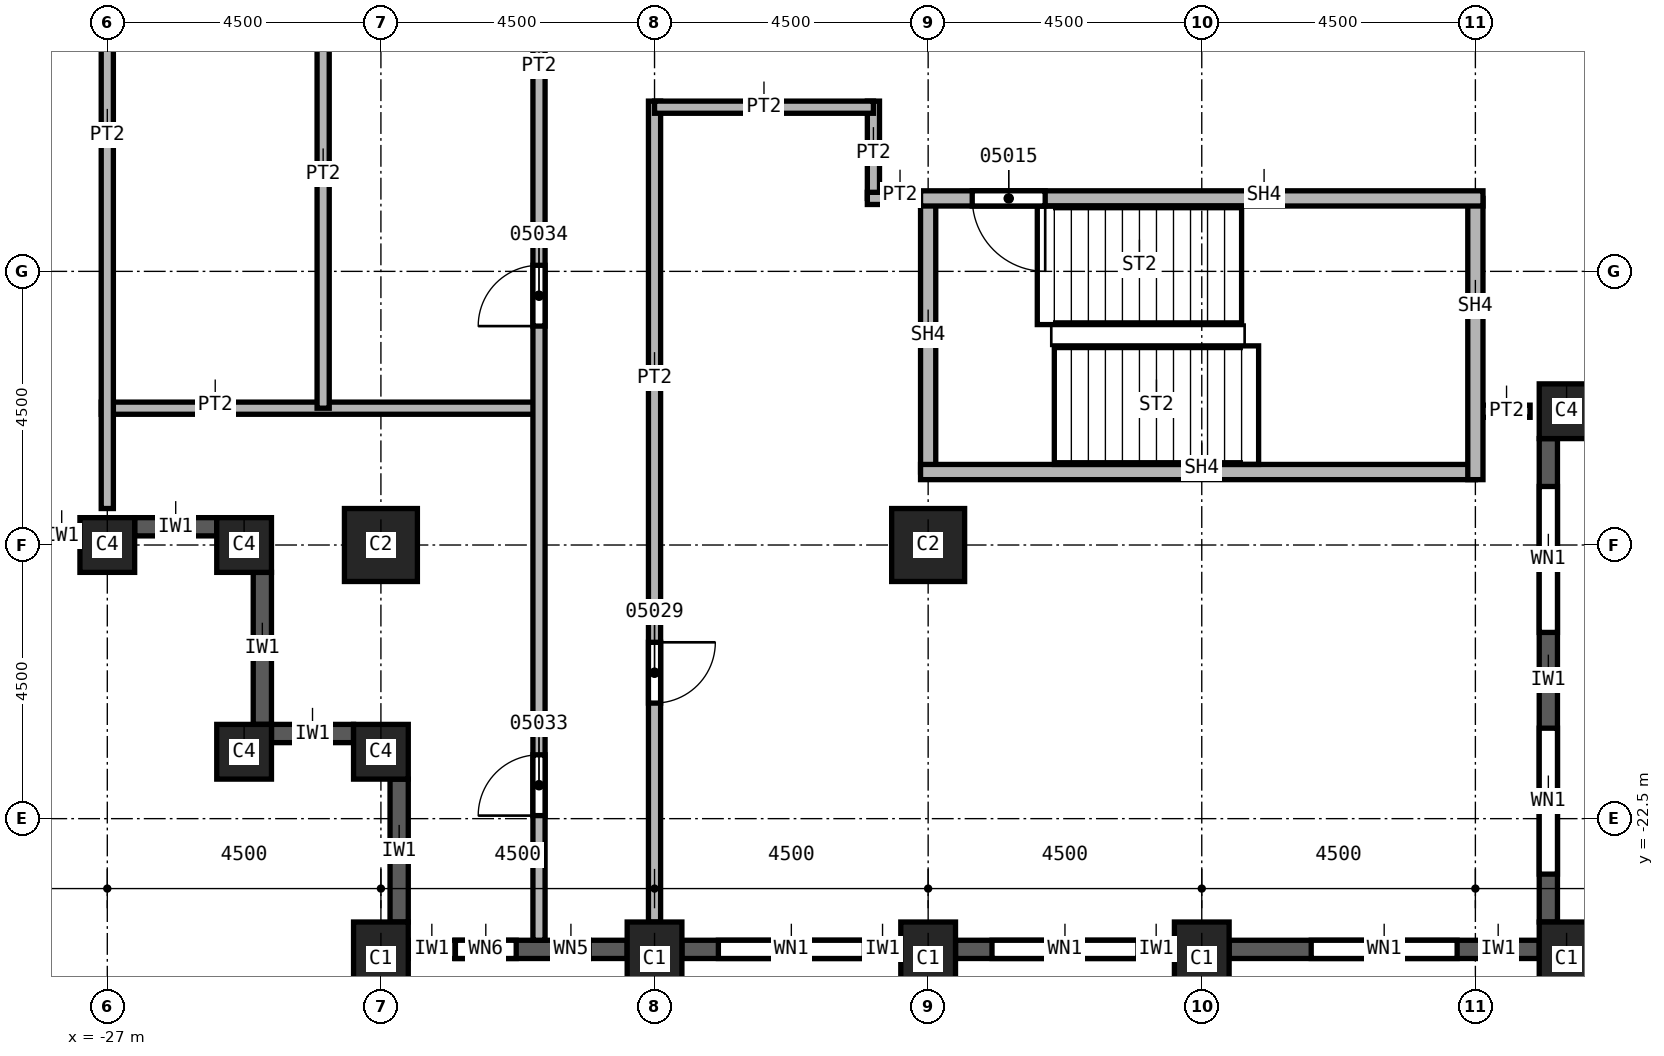
"""IFC4 building model, lengths in metres.
Left out: names, types, materials, properties, quantities, classifications, styles, units other than length and angle.
Written with IfcOpenShell. Run it as: python <this file> out.ifc"""

import sys

from ifc_helpers import new_model, si_unit, direction, frame, frame_2d, origin, origin_2d, place, context, subcontext, project, spatial, rectangle, extrude, element, fill, save


model = new_model("IFC4")
c1 = context("Model", 3, precision=1e-05, world=origin(), true_north=direction((0.0, 1.0)))
c2 = subcontext(c1, "Body", "Model", "MODEL_VIEW")
j1 = project(units=[si_unit("LENGTHUNIT", "METRE"), si_unit("PLANEANGLEUNIT", "RADIAN")], contexts=[c1])
p1 = place(None, origin())
s1 = spatial("IfcSite", under=j1, at=p1, CompositionType="ELEMENT")
p2 = place(p1, origin())
s2 = spatial("IfcBuilding", under=s1, at=p2, CompositionType="ELEMENT")
p3 = place(p2, frame((0.0, 0.0, 116.0)))
s3 = spatial("IfcBuildingStorey", under=s2, at=p3, CompositionType="ELEMENT", Elevation=116.0)
for number, where, z_axis, x_axis in (
    (1, (-13.5, -18.0, 0.0), (0.0, 0.0, 1.0), (1.0, 0.0, 0.0)),
    (2, (-22.5, -18.0, 0.0), (0.0, 0.0, 1.0), (1.0, 0.0, 0.0)),
):
    element("IfcColumn", number, at=place(p3, frame(where, z_axis=z_axis, x_axis=x_axis)), inside=s3, PredefinedType="COLUMN", context=c2, shape_type="SweptSolid", body=[
        extrude(rectangle(XDim=1.2, YDim=1.2, at=origin_2d()), origin(), (0.0, 0.0, 1.0), 3.6),
    ])
for number, where, z_axis, x_axis in (
    (3, (-3.0, -24.8, 0.0), (0.0, 0.0, 1.0), (1.0, 0.0, 0.0)),
    (4, (-9.0, -24.8, 0.0), (0.0, 0.0, 1.0), (1.0, 0.0, 0.0)),
    (5, (-13.5, -24.8, 0.0), (0.0, 0.0, 1.0), (1.0, 0.0, 0.0)),
    (6, (-18.0, -24.8, 0.0), (0.0, 0.0, 1.0), (1.0, 0.0, 0.0)),
    (7, (-22.5, -24.8, 0.0), (0.0, 0.0, 1.0), (1.0, 0.0, 0.0)),
):
    element("IfcColumn", number, at=place(p3, frame(where, z_axis=z_axis, x_axis=x_axis)), inside=s3, PredefinedType="COLUMN", context=c2, shape_type="SweptSolid", body=[
        extrude(rectangle(XDim=0.9, YDim=1.2, at=origin_2d()), origin(), (0.0, 0.0, 1.0), 3.6),
    ])
for number, where, z_axis, x_axis in (
    (8, (-27.0, -18.0, 0.0), (0.0, 0.0, 1.0), (1.0, 0.0, 0.0)),
    (9, (-3.0, -15.8, 0.0), (0.0, 0.0, 1.0), (1.0, 0.0, 0.0)),
    (10, (-22.5, -21.4, 0.0), (0.0, 0.0, 1.0), (1.0, 0.0, 0.0)),
    (11, (-24.75, -21.4, 0.0), (0.0, 0.0, 1.0), (1.0, 0.0, 0.0)),
    (12, (-24.75, -18.0, 0.0), (0.0, 0.0, 1.0), (1.0, 0.0, 0.0)),
):
    element("IfcColumn", number, at=place(p3, frame(where, z_axis=z_axis, x_axis=x_axis)), inside=s3, PredefinedType="COLUMN", context=c2, shape_type="SweptSolid", body=[
        extrude(rectangle(XDim=0.9, YDim=0.9, at=origin_2d()), origin(), (0.0, 0.0, 1.0), 3.6),
    ])
p4 = place(p3, frame((-31.05, -17.85, 0.0), z_axis=(0.0, 0.0, 1.0), x_axis=(1.0, 0.0, 0.0)))
e13 = element("IfcWall", 13, at=p4, inside=s3, PredefinedType="SOLIDWALL", context=c2, shape_type="SweptSolid", body=[
    extrude(rectangle(XDim=3.6, YDim=0.3, at=frame_2d((1.8, 0.0))), origin(), (0.0, 0.0, 1.0), 3.0),
])
p5 = place(p4, frame((0.6, 0.0, 0.8)))
e14 = element("IfcOpeningElement", 14, at=p5, cuts=e13, PredefinedType="OPENING", context=c2, shape_type="SweptSolid", body=[
    extrude(rectangle(XDim=2.4, YDim=1.95, at=frame_2d((1.2, 0.975))), frame((0.0, 0.15, 0.0), z_axis=(0.0, -1.0, 0.0), x_axis=(1.0, 0.0, 0.0)), (0.0, 0.0, 1.0), 0.3),
])
p6 = place(p3, frame((-26.55, -17.7, 0.0), z_axis=(0.0, 0.0, 1.0), x_axis=(1.0, 0.0, 0.0)))
e15 = element("IfcWall", 15, at=p6, inside=s3, PredefinedType="SOLIDWALL", context=c2, shape_type="SweptSolid", body=[
    extrude(rectangle(XDim=1.35, YDim=0.3, at=frame_2d((0.675, 0.0))), origin(), (0.0, 0.0, 1.0), 3.0),
])
p7 = place(p3, frame((-24.45, -18.45, 0.0), z_axis=(0.0, 0.0, 1.0), x_axis=(0.0, -1.0, 0.0)))
e16 = element("IfcWall", 16, at=p7, inside=s3, PredefinedType="SOLIDWALL", context=c2, shape_type="SweptSolid", body=[
    extrude(rectangle(XDim=2.5, YDim=0.3, at=frame_2d((1.25, 0.0))), origin(), (0.0, 0.0, 1.0), 3.0),
])
p8 = place(p3, frame((-24.3, -21.1, 0.0), z_axis=(0.0, 0.0, 1.0), x_axis=(1.0, 0.0, 0.0)))
e17 = element("IfcWall", 17, at=p8, inside=s3, PredefinedType="SOLIDWALL", context=c2, shape_type="SweptSolid", body=[
    extrude(rectangle(XDim=1.35, YDim=0.3, at=frame_2d((0.675, 0.0))), origin(), (0.0, 0.0, 1.0), 3.0),
])
p9 = place(p3, frame((-22.2, -21.85, 0.0), z_axis=(0.0, 0.0, 1.0), x_axis=(0.0, -1.0, 0.0)))
e18 = element("IfcWall", 18, at=p9, inside=s3, PredefinedType="SOLIDWALL", context=c2, shape_type="SweptSolid", body=[
    extrude(rectangle(XDim=2.35, YDim=0.3, at=frame_2d((1.175, 0.0))), origin(), (0.0, 0.0, 1.0), 3.0),
])
p10 = place(p3, frame((-22.05, -24.65, 0.0), z_axis=(0.0, 0.0, 1.0), x_axis=(1.0, 0.0, 0.0)))
e19 = element("IfcWall", 19, at=p10, inside=s3, PredefinedType="SOLIDWALL", context=c2, shape_type="SweptSolid", body=[
    extrude(rectangle(XDim=3.6, YDim=0.3, at=frame_2d((1.8, 0.0))), origin(), (0.0, 0.0, 1.0), 3.0),
])
p11 = place(p10, frame((0.775, 0.0, 0.8)))
e20 = element("IfcOpeningElement", 20, at=p11, cuts=e19, PredefinedType="OPENING", context=c2, shape_type="SweptSolid", body=[
    extrude(rectangle(XDim=1.0, YDim=1.95, at=frame_2d((0.5, 0.975))), frame((0.0, 0.15, 0.0), z_axis=(0.0, -1.0, 0.0), x_axis=(1.0, 0.0, 0.0)), (0.0, 0.0, 1.0), 0.3),
])
p12 = place(p10, frame((2.375, 0.0, 0.8)))
e21 = element("IfcOpeningElement", 21, at=p12, cuts=e19, PredefinedType="OPENING", context=c2, shape_type="SweptSolid", body=[
    extrude(rectangle(XDim=0.6, YDim=1.95, at=frame_2d((0.3, 0.975))), frame((0.0, 0.15, 0.0), z_axis=(0.0, -1.0, 0.0), x_axis=(1.0, 0.0, 0.0)), (0.0, 0.0, 1.0), 0.3),
])
p13 = place(p3, frame((-17.55, -24.65, 0.0), z_axis=(0.0, 0.0, 1.0), x_axis=(1.0, 0.0, 0.0)))
e22 = element("IfcWall", 22, at=p13, inside=s3, PredefinedType="SOLIDWALL", context=c2, shape_type="SweptSolid", body=[
    extrude(rectangle(XDim=3.6, YDim=0.3, at=frame_2d((1.8, 0.0))), origin(), (0.0, 0.0, 1.0), 3.0),
])
p14 = place(p13, frame((0.6, 0.0, 0.8)))
e23 = element("IfcOpeningElement", 23, at=p14, cuts=e22, PredefinedType="OPENING", context=c2, shape_type="SweptSolid", body=[
    extrude(rectangle(XDim=2.4, YDim=1.95, at=frame_2d((1.2, 0.975))), frame((0.0, 0.15, 0.0), z_axis=(0.0, -1.0, 0.0), x_axis=(1.0, 0.0, 0.0)), (0.0, 0.0, 1.0), 0.3),
])
p15 = place(p3, frame((-13.05, -24.65, 0.0), z_axis=(0.0, 0.0, 1.0), x_axis=(1.0, 0.0, 0.0)))
e24 = element("IfcWall", 24, at=p15, inside=s3, PredefinedType="SOLIDWALL", context=c2, shape_type="SweptSolid", body=[
    extrude(rectangle(XDim=3.6, YDim=0.3, at=frame_2d((1.8, 0.0))), origin(), (0.0, 0.0, 1.0), 3.0),
])
p16 = place(p15, frame((0.6, 0.0, 0.8)))
e25 = element("IfcOpeningElement", 25, at=p16, cuts=e24, PredefinedType="OPENING", context=c2, shape_type="SweptSolid", body=[
    extrude(rectangle(XDim=2.4, YDim=1.95, at=frame_2d((1.2, 0.975))), frame((0.0, 0.15, 0.0), z_axis=(0.0, -1.0, 0.0), x_axis=(1.0, 0.0, 0.0)), (0.0, 0.0, 1.0), 0.3),
])
p17 = place(p3, frame((-8.55, -24.65, 0.0), z_axis=(0.0, 0.0, 1.0), x_axis=(1.0, 0.0, 0.0)))
e26 = element("IfcWall", 26, at=p17, inside=s3, PredefinedType="SOLIDWALL", context=c2, shape_type="SweptSolid", body=[
    extrude(rectangle(XDim=5.1, YDim=0.3, at=frame_2d((2.55, 0.0))), origin(), (0.0, 0.0, 1.0), 3.0),
])
p18 = place(p17, frame((1.35, 0.0, 0.8)))
e27 = element("IfcOpeningElement", 27, at=p18, cuts=e26, PredefinedType="OPENING", context=c2, shape_type="SweptSolid", body=[
    extrude(rectangle(XDim=2.4, YDim=1.95, at=frame_2d((1.2, 0.975))), frame((0.0, 0.15, 0.0), z_axis=(0.0, -1.0, 0.0), x_axis=(1.0, 0.0, 0.0)), (0.0, 0.0, 1.0), 0.3),
])
p19 = place(p3, frame((-3.3, -24.2, 0.0), z_axis=(0.0, 0.0, 1.0), x_axis=(0.0, 1.0, 0.0)))
e28 = element("IfcWall", 28, at=p19, inside=s3, PredefinedType="SOLIDWALL", context=c2, shape_type="SweptSolid", body=[
    extrude(rectangle(XDim=7.95, YDim=0.3, at=frame_2d((3.975, 0.0))), origin(), (0.0, 0.0, 1.0), 3.0),
])
p20 = place(p19, frame((0.788, 0.0, 0.8)))
e29 = element("IfcOpeningElement", 29, at=p20, cuts=e28, PredefinedType="OPENING", context=c2, shape_type="SweptSolid", body=[
    extrude(rectangle(XDim=2.4, YDim=1.95, at=frame_2d((1.2, 0.975))), frame((0.0, 0.15, 0.0), z_axis=(0.0, -1.0, 0.0), x_axis=(1.0, 0.0, 0.0)), (0.0, 0.0, 1.0), 0.3),
])
p21 = place(p19, frame((4.762, 0.0, 0.8)))
e30 = element("IfcOpeningElement", 30, at=p21, cuts=e28, PredefinedType="OPENING", context=c2, shape_type="SweptSolid", body=[
    extrude(rectangle(XDim=2.4, YDim=1.95, at=frame_2d((1.2, 0.975))), frame((0.0, 0.15, 0.0), z_axis=(0.0, -1.0, 0.0), x_axis=(1.0, 0.0, 0.0)), (0.0, 0.0, 1.0), 0.3),
])
p22 = place(p3, frame((-27.1, -15.75, 0.0), z_axis=(0.0, 0.0, 1.0), x_axis=(1.0, 0.0, 0.0)))
e31 = element("IfcWall", 31, at=p22, inside=s3, PredefinedType="PARTITIONING", context=c2, shape_type="SweptSolid", body=[
    extrude(rectangle(XDim=7.2, YDim=0.2, at=frame_2d((3.6, 0.0))), origin(), (0.0, 0.0, 1.0), 3.6),
])
p23 = place(p3, frame((-27.0, -17.4, 0.0), z_axis=(0.0, 0.0, 1.0), x_axis=(0.0, 1.0, 0.0)))
e32 = element("IfcWall", 32, at=p23, inside=s3, PredefinedType="PARTITIONING", context=c2, shape_type="SweptSolid", body=[
    extrude(rectangle(XDim=18.15, YDim=0.2, at=frame_2d((9.075, 0.0))), origin(), (0.0, 0.0, 1.0), 3.6),
])
p24 = place(p3, frame((-23.45, -15.75, 0.0), z_axis=(0.0, 0.0, 1.0), x_axis=(0.0, 1.0, 0.0)))
e33 = element("IfcWall", 33, at=p24, inside=s3, PredefinedType="PARTITIONING", context=c2, shape_type="SweptSolid", body=[
    extrude(rectangle(XDim=16.5, YDim=0.2, at=frame_2d((8.25, 0.0))), origin(), (0.0, 0.0, 1.0), 3.6),
])
p25 = place(p24, frame((7.6, 0.0, 0.0)))
e34 = element("IfcOpeningElement", 34, at=p25, cuts=e33, PredefinedType="OPENING", context=c2, shape_type="SweptSolid", body=[
    extrude(rectangle(XDim=1.0, YDim=2.1, at=frame_2d((0.5, 1.05))), frame((0.0, 0.1, 0.0), z_axis=(0.0, -1.0, 0.0), x_axis=(1.0, 0.0, 0.0)), (0.0, 0.0, 1.0), 0.2),
])
p26 = place(p24, frame((13.15, 0.0, 0.0)))
e35 = element("IfcOpeningElement", 35, at=p26, cuts=e33, PredefinedType="OPENING", context=c2, shape_type="SweptSolid", body=[
    extrude(rectangle(XDim=1.0, YDim=2.1, at=frame_2d((0.5, 1.05))), frame((0.0, 0.1, 0.0), z_axis=(0.0, -1.0, 0.0), x_axis=(1.0, 0.0, 0.0)), (0.0, 0.0, 1.0), 0.2),
])
p27 = place(p3, frame((-19.9, -24.5, 0.0), z_axis=(0.0, 0.0, 1.0), x_axis=(0.0, 1.0, 0.0)))
e36 = element("IfcWall", 36, at=p27, inside=s3, PredefinedType="PARTITIONING", context=c2, shape_type="SweptSolid", body=[
    extrude(rectangle(XDim=25.35, YDim=0.2, at=frame_2d((12.675, 0.0))), origin(), (0.0, 0.0, 1.0), 3.6),
])
p28 = place(p27, frame((2.05, 0.0, 0.0)))
e37 = element("IfcOpeningElement", 37, at=p28, cuts=e36, PredefinedType="OPENING", context=c2, shape_type="SweptSolid", body=[
    extrude(rectangle(XDim=1.0, YDim=2.1, at=frame_2d((0.5, 1.05))), frame((0.0, 0.1, 0.0), z_axis=(0.0, -1.0, 0.0), x_axis=(1.0, 0.0, 0.0)), (0.0, 0.0, 1.0), 0.2),
])
p29 = place(p27, frame((10.1, 0.0, 0.0)))
e38 = element("IfcOpeningElement", 38, at=p29, cuts=e36, PredefinedType="OPENING", context=c2, shape_type="SweptSolid", body=[
    extrude(rectangle(XDim=1.0, YDim=2.1, at=frame_2d((0.5, 1.05))), frame((0.0, 0.1, 0.0), z_axis=(0.0, -1.0, 0.0), x_axis=(1.0, 0.0, 0.0)), (0.0, 0.0, 1.0), 0.2),
])
p30 = place(p27, frame((22.85, 0.0, 0.0)))
e39 = element("IfcOpeningElement", 39, at=p30, cuts=e36, PredefinedType="OPENING", context=c2, shape_type="SweptSolid", body=[
    extrude(rectangle(XDim=1.0, YDim=2.1, at=frame_2d((0.5, 1.05))), frame((0.0, 0.1, 0.0), z_axis=(0.0, -1.0, 0.0), x_axis=(1.0, 0.0, 0.0)), (0.0, 0.0, 1.0), 0.2),
])
p31 = place(p3, frame((-18.0, -10.7, 0.0), z_axis=(0.0, 0.0, 1.0), x_axis=(0.0, -1.0, 0.0)))
e40 = element("IfcWall", 40, at=p31, inside=s3, PredefinedType="PARTITIONING", context=c2, shape_type="SweptSolid", body=[
    extrude(rectangle(XDim=13.5, YDim=0.2, at=frame_2d((6.75, 0.0))), origin(), (0.0, 0.0, 1.0), 3.6),
])
p32 = place(p31, frame((8.9, 0.0, 0.0)))
e41 = element("IfcOpeningElement", 41, at=p32, cuts=e40, PredefinedType="OPENING", context=c2, shape_type="SweptSolid", body=[
    extrude(rectangle(XDim=1.0, YDim=2.1, at=frame_2d((0.5, 1.05))), frame((0.0, 0.1, 0.0), z_axis=(0.0, -1.0, 0.0), x_axis=(1.0, 0.0, 0.0)), (0.0, 0.0, 1.0), 0.2),
])
p33 = place(p3, frame((-14.4, -12.3, 0.0), z_axis=(0.0, 0.0, 1.0), x_axis=(0.0, 1.0, 0.0)))
e42 = element("IfcWall", 42, at=p33, inside=s3, PredefinedType="PARTITIONING", context=c2, shape_type="SweptSolid", body=[
    extrude(rectangle(XDim=1.6, YDim=0.2, at=frame_2d((0.8, 0.0))), origin(), (0.0, 0.0, 1.0), 3.6),
])
p34 = place(p3, frame((-14.4, -10.8, 0.0), z_axis=(0.0, 0.0, 1.0), x_axis=(-1.0, 0.0, 0.0)))
e43 = element("IfcWall", 43, at=p34, inside=s3, PredefinedType="PARTITIONING", context=c2, shape_type="SweptSolid", body=[
    extrude(rectangle(XDim=3.6, YDim=0.2, at=frame_2d((1.8, 0.0))), origin(), (0.0, 0.0, 1.0), 3.6),
])
p35 = place(p3, frame((-13.375, -12.3, 0.0), z_axis=(0.0, 0.0, 1.0), x_axis=(-1.0, 0.0, 0.0)))
e44 = element("IfcWall", 44, at=p35, inside=s3, PredefinedType="PARTITIONING", context=c2, shape_type="SweptSolid", body=[
    extrude(rectangle(XDim=1.125, YDim=0.2, at=frame_2d((0.562, 0.0))), origin(), (0.0, 0.0, 1.0), 3.6),
])
p36 = place(p3, frame((-3.6, -15.8, 0.0), z_axis=(0.0, 0.0, 1.0), x_axis=(-1.0, 0.0, 0.0)))
e45 = element("IfcWall", 45, at=p36, inside=s3, PredefinedType="PARTITIONING", context=c2, shape_type="SweptSolid", body=[
    extrude(rectangle(XDim=0.9, YDim=0.2, at=frame_2d((0.45, 0.0))), origin(), (0.0, 0.0, 1.0), 3.6),
])
p37 = place(p3, frame((-13.5, -16.8, 0.0), z_axis=(0.0, 0.0, 1.0), x_axis=(0.0, 1.0, 0.0)))
e46 = element("IfcWall", 46, at=p37, inside=s3, PredefinedType="SOLIDWALL", context=c2, shape_type="SweptSolid", body=[
    extrude(rectangle(XDim=4.5, YDim=0.25, at=frame_2d((2.25, 0.0))), origin(), (0.0, 0.0, 1.0), 3.6),
])
p38 = place(p3, frame((-4.5, -16.8, 0.0), z_axis=(0.0, 0.0, 1.0), x_axis=(-1.0, 0.0, 0.0)))
e47 = element("IfcWall", 47, at=p38, inside=s3, PredefinedType="SOLIDWALL", context=c2, shape_type="SweptSolid", body=[
    extrude(rectangle(XDim=9.125, YDim=0.25, at=frame_2d((4.562, 0.0))), origin(), (0.0, 0.0, 1.0), 3.6),
])
p39 = place(p3, frame((-4.5, -12.3, 0.0), z_axis=(0.0, 0.0, 1.0), x_axis=(0.0, -1.0, 0.0)))
e48 = element("IfcWall", 48, at=p39, inside=s3, PredefinedType="SOLIDWALL", context=c2, shape_type="SweptSolid", body=[
    extrude(rectangle(XDim=4.625, YDim=0.25, at=frame_2d((2.312, 0.0))), origin(), (0.0, 0.0, 1.0), 3.6),
])
p40 = place(p3, frame((-4.375, -12.3, 0.0), z_axis=(0.0, 0.0, 1.0), x_axis=(-1.0, 0.0, 0.0)))
e49 = element("IfcWall", 49, at=p40, inside=s3, PredefinedType="SOLIDWALL", context=c2, shape_type="SweptSolid", body=[
    extrude(rectangle(XDim=9.25, YDim=0.25, at=frame_2d((4.625, 0.0))), origin(), (0.0, 0.0, 1.0), 3.6),
])
p41 = place(p40, frame((7.2, 0.0, 0.0)))
e50 = element("IfcOpeningElement", 50, at=p41, cuts=e49, PredefinedType="OPENING", context=c2, shape_type="SweptSolid", body=[
    extrude(rectangle(XDim=1.2, YDim=2.1, at=frame_2d((0.6, 1.05))), frame((0.0, 0.125, 0.0), z_axis=(0.0, -1.0, 0.0), x_axis=(1.0, 0.0, 0.0)), (0.0, 0.0, 1.0), 0.25),
])
p42 = place(p14, origin())
e51 = element("IfcWindow", 51, at=p42, inside=s3, PartitioningType="SINGLE_PANEL", PredefinedType="WINDOW", context=c2, shape_type="SweptSolid", body=[
    extrude(rectangle(XDim=2.4, YDim=1.95, at=frame_2d((1.2, 0.975))), frame((0.0, 0.03, 0.0), z_axis=(0.0, -1.0, 0.0), x_axis=(1.0, 0.0, 0.0)), (0.0, 0.0, 1.0), 0.06),
])
fill(e23, e51)
p43 = place(p16, origin())
e52 = element("IfcWindow", 52, at=p43, inside=s3, PartitioningType="SINGLE_PANEL", PredefinedType="WINDOW", context=c2, shape_type="SweptSolid", body=[
    extrude(rectangle(XDim=2.4, YDim=1.95, at=frame_2d((1.2, 0.975))), frame((0.0, 0.03, 0.0), z_axis=(0.0, -1.0, 0.0), x_axis=(1.0, 0.0, 0.0)), (0.0, 0.0, 1.0), 0.06),
])
fill(e25, e52)
p44 = place(p18, origin())
e53 = element("IfcWindow", 53, at=p44, inside=s3, PartitioningType="SINGLE_PANEL", PredefinedType="WINDOW", context=c2, shape_type="SweptSolid", body=[
    extrude(rectangle(XDim=2.4, YDim=1.95, at=frame_2d((1.2, 0.975))), frame((0.0, 0.03, 0.0), z_axis=(0.0, -1.0, 0.0), x_axis=(1.0, 0.0, 0.0)), (0.0, 0.0, 1.0), 0.06),
])
fill(e27, e53)
p45 = place(p20, origin())
e54 = element("IfcWindow", 54, at=p45, inside=s3, PartitioningType="SINGLE_PANEL", PredefinedType="WINDOW", context=c2, shape_type="SweptSolid", body=[
    extrude(rectangle(XDim=2.4, YDim=1.95, at=frame_2d((1.2, 0.975))), frame((0.0, 0.03, 0.0), z_axis=(0.0, -1.0, 0.0), x_axis=(1.0, 0.0, 0.0)), (0.0, 0.0, 1.0), 0.06),
])
fill(e29, e54)
p46 = place(p21, origin())
e55 = element("IfcWindow", 55, at=p46, inside=s3, PartitioningType="SINGLE_PANEL", PredefinedType="WINDOW", context=c2, shape_type="SweptSolid", body=[
    extrude(rectangle(XDim=2.4, YDim=1.95, at=frame_2d((1.2, 0.975))), frame((0.0, 0.03, 0.0), z_axis=(0.0, -1.0, 0.0), x_axis=(1.0, 0.0, 0.0)), (0.0, 0.0, 1.0), 0.06),
])
fill(e30, e55)
p47 = place(p41, origin())
e56 = element("IfcDoor", 56, at=p47, inside=s3, OperationType="SINGLE_SWING_RIGHT", PredefinedType="DOOR", context=c2, shape_type="SweptSolid", body=[
    extrude(rectangle(XDim=1.2, YDim=2.1, at=frame_2d((0.6, 1.05))), frame((0.0, 0.025, 0.0), z_axis=(0.0, -1.0, 0.0), x_axis=(1.0, 0.0, 0.0)), (0.0, 0.0, 1.0), 0.05),
])
fill(e50, e56)
p48 = place(p32, origin())
e57 = element("IfcDoor", 57, at=p48, inside=s3, OperationType="SINGLE_SWING_RIGHT", PredefinedType="DOOR", context=c2, shape_type="SweptSolid", body=[
    extrude(rectangle(XDim=1.0, YDim=2.1, at=frame_2d((0.5, 1.05))), frame((0.0, 0.025, 0.0), z_axis=(0.0, -1.0, 0.0), x_axis=(1.0, 0.0, 0.0)), (0.0, 0.0, 1.0), 0.05),
])
fill(e41, e57)
p49 = place(p28, origin())
e58 = element("IfcDoor", 58, at=p49, inside=s3, OperationType="SINGLE_SWING_RIGHT", PredefinedType="DOOR", context=c2, shape_type="SweptSolid", body=[
    extrude(rectangle(XDim=1.0, YDim=2.1, at=frame_2d((0.5, 1.05))), frame((0.0, 0.025, 0.0), z_axis=(0.0, -1.0, 0.0), x_axis=(1.0, 0.0, 0.0)), (0.0, 0.0, 1.0), 0.05),
])
fill(e37, e58)
p50 = place(p29, origin())
e59 = element("IfcDoor", 59, at=p50, inside=s3, OperationType="SINGLE_SWING_LEFT", PredefinedType="DOOR", context=c2, shape_type="SweptSolid", body=[
    extrude(rectangle(XDim=1.0, YDim=2.1, at=frame_2d((0.5, 1.05))), frame((0.0, 0.025, 0.0), z_axis=(0.0, -1.0, 0.0), x_axis=(1.0, 0.0, 0.0)), (0.0, 0.0, 1.0), 0.05),
])
fill(e38, e59)
p51 = place(p11, origin())
e60 = element("IfcWindow", 60, at=p51, inside=s3, PartitioningType="SINGLE_PANEL", PredefinedType="WINDOW", context=c2, shape_type="SweptSolid", body=[
    extrude(rectangle(XDim=1.0, YDim=1.95, at=frame_2d((0.5, 0.975))), frame((0.0, 0.03, 0.0), z_axis=(0.0, -1.0, 0.0), x_axis=(1.0, 0.0, 0.0)), (0.0, 0.0, 1.0), 0.06),
])
fill(e20, e60)
p52 = place(p12, origin())
e61 = element("IfcWindow", 61, at=p52, inside=s3, PartitioningType="SINGLE_PANEL", PredefinedType="WINDOW", context=c2, shape_type="SweptSolid", body=[
    extrude(rectangle(XDim=0.6, YDim=1.95, at=frame_2d((0.3, 0.975))), frame((0.0, 0.03, 0.0), z_axis=(0.0, -1.0, 0.0), x_axis=(1.0, 0.0, 0.0)), (0.0, 0.0, 1.0), 0.06),
])
fill(e21, e61)
save(model, sys.argv[1])
